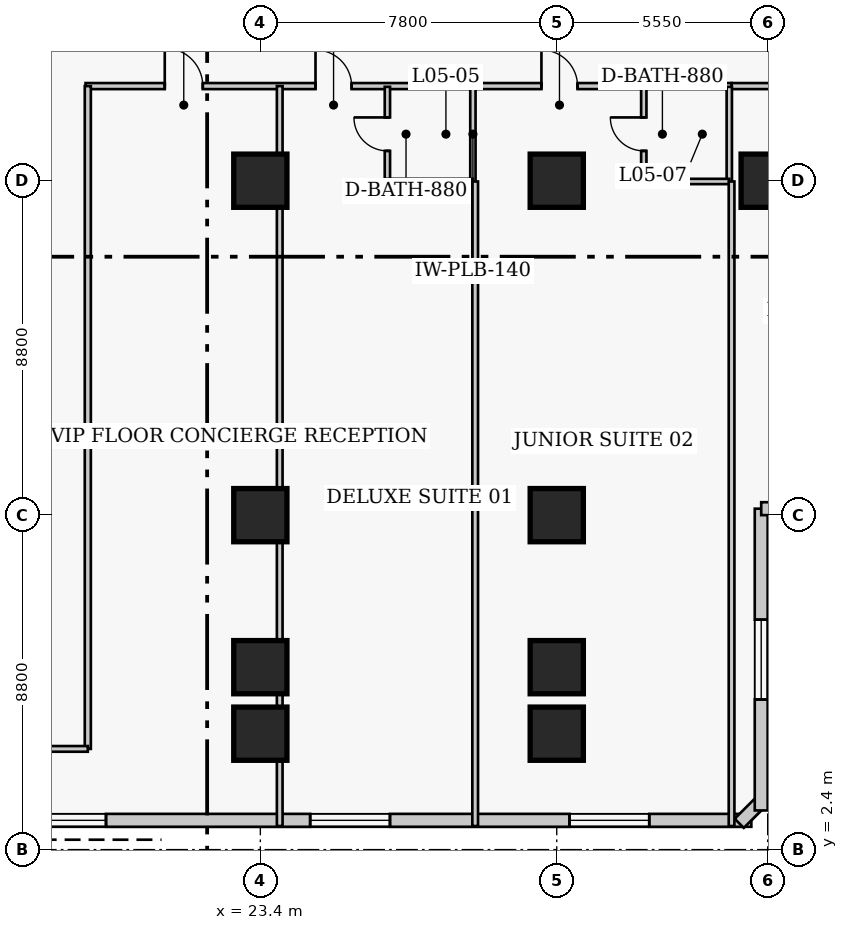
"""IFC4 building model, lengths in metres.
Left out: names, types, materials, properties, quantities, classifications, styles, units other than length and angle.
Written with IfcOpenShell. Run it as: python <this file> out.ifc"""

import sys

from ifc_helpers import new_model, si_unit, direction, frame, frame_2d, origin, origin_2d, place, context, subcontext, project, spatial, rectangle, extrude, element, fill, save


model = new_model("IFC4")
c1 = context("Model", 3, precision=1e-05, world=origin(), true_north=direction((0.0, 1.0)))
c2 = subcontext(c1, "Body", "Model", "MODEL_VIEW")
j1 = project(units=[si_unit("LENGTHUNIT", "METRE"), si_unit("PLANEANGLEUNIT", "RADIAN")], contexts=[c1])
p1 = place(None, origin())
s1 = spatial("IfcSite", under=j1, at=p1, CompositionType="ELEMENT")
p2 = place(p1, origin())
s2 = spatial("IfcBuilding", under=s1, at=p2, CompositionType="ELEMENT")
p3 = place(p2, frame((0.0, 0.0, 26.0)))
s3 = spatial("IfcBuildingStorey", under=s2, at=p3, CompositionType="ELEMENT", Elevation=26.0)
p4 = place(p3, frame((23.4, 11.2, 0.0), z_axis=(0.0, 0.0, 1.0), x_axis=(1.0, 0.0, 0.0)))
e1 = element("IfcColumn", 1, at=p4, inside=s3, PredefinedType="COLUMN", context=c2, shape_type="SweptSolid", body=[
    extrude(rectangle(XDim=1.4, YDim=1.4, at=origin_2d()), origin(), (0.0, 0.0, 1.0), 3.8),
])
p5 = place(p3, frame((23.4, 20.0, -0.26), z_axis=(0.0, 0.0, 1.0), x_axis=(1.0, 0.0, 0.0)))
e2 = element("IfcColumn", 2, at=p5, inside=s3, PredefinedType="COLUMN", context=c2, shape_type="SweptSolid", body=[
    extrude(rectangle(XDim=1.4, YDim=1.4, at=origin_2d()), origin(), (0.0, 0.0, 1.0), 4.06),
])
p6 = place(p3, frame((31.2, 11.2, 0.0), z_axis=(0.0, 0.0, 1.0), x_axis=(1.0, 0.0, 0.0)))
e3 = element("IfcColumn", 3, at=p6, inside=s3, PredefinedType="COLUMN", context=c2, shape_type="SweptSolid", body=[
    extrude(rectangle(XDim=1.4, YDim=1.4, at=origin_2d()), origin(), (0.0, 0.0, 1.0), 3.8),
])
p7 = place(p3, frame((31.2, 20.0, -0.26), z_axis=(0.0, 0.0, 1.0), x_axis=(1.0, 0.0, 0.0)))
e4 = element("IfcColumn", 4, at=p7, inside=s3, PredefinedType="COLUMN", context=c2, shape_type="SweptSolid", body=[
    extrude(rectangle(XDim=1.4, YDim=1.4, at=origin_2d()), origin(), (0.0, 0.0, 1.0), 4.06),
])
for number, where, z_axis, x_axis in (
    (5, (36.75, 20.0, 0.0), (0.0, 0.0, 1.0), (1.0, 0.0, 0.0)),
    (6, (23.4, 7.2, 0.0), (0.0, 0.0, 1.0), (1.0, 0.0, 0.0)),
    (7, (31.2, 7.2, 0.0), (0.0, 0.0, 1.0), (1.0, 0.0, 0.0)),
    (8, (23.4, 5.45, 0.0), (0.0, 0.0, 1.0), (1.0, 0.0, 0.0)),
    (9, (31.2, 5.45, 0.0), (0.0, 0.0, 1.0), (1.0, 0.0, 0.0)),
):
    element("IfcColumn", number, at=place(p3, frame(where, z_axis=z_axis, x_axis=x_axis)), inside=s3, PredefinedType="COLUMN", context=c2, shape_type="SweptSolid", body=[
        extrude(rectangle(XDim=1.4, YDim=1.4, at=origin_2d()), origin(), (0.0, 0.0, 1.0), 3.8),
    ])
p8 = place(p3, frame((6.43, 3.17, 0.0), z_axis=(0.0, 0.0, 1.0), x_axis=(1.0, 0.0, 0.0)))
e10 = element("IfcWall", 10, at=p8, inside=s3, PredefinedType="SOLIDWALL", context=c2, shape_type="SweptSolid", body=[
    extrude(rectangle(XDim=29.89, YDim=0.34, at=frame_2d((14.945, 0.0))), origin(), (0.0, 0.0, 1.0), 3.54),
])
p9 = place(p8, frame((2.686, 0.0, 0.85)))
e11 = element("IfcOpeningElement", 11, at=p9, cuts=e10, PredefinedType="OPENING", context=c2, shape_type="SweptSolid", body=[
    extrude(rectangle(XDim=2.1, YDim=1.85, at=frame_2d((1.05, 0.925))), frame((0.0, 0.18, 0.0), z_axis=(0.0, -1.0, 0.0), x_axis=(1.0, 0.0, 0.0)), (0.0, 0.0, 1.0), 0.36),
])
p10 = place(p8, frame((10.809, 0.0, 0.85)))
e12 = element("IfcOpeningElement", 12, at=p10, cuts=e10, PredefinedType="OPENING", context=c2, shape_type="SweptSolid", body=[
    extrude(rectangle(XDim=2.1, YDim=1.85, at=frame_2d((1.05, 0.925))), frame((0.0, 0.18, 0.0), z_axis=(0.0, -1.0, 0.0), x_axis=(1.0, 0.0, 0.0)), (0.0, 0.0, 1.0), 0.36),
])
p11 = place(p8, frame((18.281, 0.0, 0.85)))
e13 = element("IfcOpeningElement", 13, at=p11, cuts=e10, PredefinedType="OPENING", context=c2, shape_type="SweptSolid", body=[
    extrude(rectangle(XDim=2.1, YDim=1.85, at=frame_2d((1.05, 0.925))), frame((0.0, 0.18, 0.0), z_axis=(0.0, -1.0, 0.0), x_axis=(1.0, 0.0, 0.0)), (0.0, 0.0, 1.0), 0.36),
])
p12 = place(p8, frame((25.104, 0.0, 0.85)))
e14 = element("IfcOpeningElement", 14, at=p12, cuts=e10, PredefinedType="OPENING", context=c2, shape_type="SweptSolid", body=[
    extrude(rectangle(XDim=2.1, YDim=1.85, at=frame_2d((1.05, 0.925))), frame((0.0, 0.18, 0.0), z_axis=(0.0, -1.0, 0.0), x_axis=(1.0, 0.0, 0.0)), (0.0, 0.0, 1.0), 0.36),
])
p13 = place(p3, frame((36.001, 3.092, 0.0), z_axis=(0.0, 0.0, 1.0), x_axis=(0.707106781187, 0.707106781187, 0.0)))
e15 = element("IfcWall", 15, at=p13, inside=s3, PredefinedType="SOLIDWALL", context=c2, shape_type="SweptSolid", body=[
    extrude(rectangle(XDim=0.929, YDim=0.34, at=frame_2d((0.464, 0.0))), origin(), (0.0, 0.0, 1.0), 3.54),
])
p14 = place(p3, frame((36.58, 3.43, 0.0), z_axis=(0.0, 0.0, 1.0), x_axis=(0.0, 1.0, 0.0)))
e16 = element("IfcWall", 16, at=p14, inside=s3, PredefinedType="SOLIDWALL", context=c2, shape_type="SweptSolid", body=[
    extrude(rectangle(XDim=7.94, YDim=0.34, at=frame_2d((3.97, 0.0))), origin(), (0.0, 0.0, 1.0), 3.54),
])
p15 = place(p14, frame((2.92, 0.0, 0.85)))
e17 = element("IfcOpeningElement", 17, at=p15, cuts=e16, PredefinedType="OPENING", context=c2, shape_type="SweptSolid", body=[
    extrude(rectangle(XDim=2.1, YDim=1.85, at=frame_2d((1.05, 0.925))), frame((0.0, 0.18, 0.0), z_axis=(0.0, -1.0, 0.0), x_axis=(1.0, 0.0, 0.0)), (0.0, 0.0, 1.0), 0.36),
])
p16 = place(p3, frame((36.58, 11.37, 0.0), z_axis=(0.0, 0.0, 1.0), x_axis=(1.0, 0.0, 0.0)))
e18 = element("IfcWall", 18, at=p16, inside=s3, PredefinedType="SOLIDWALL", context=c2, shape_type="SweptSolid", body=[
    extrude(rectangle(XDim=4.84, YDim=0.34, at=frame_2d((2.42, 0.0))), origin(), (0.0, 0.0, 1.0), 3.54),
])
p17 = place(p16, frame((1.37, 0.0, 0.85)))
e19 = element("IfcOpeningElement", 19, at=p17, cuts=e18, PredefinedType="OPENING", context=c2, shape_type="SweptSolid", body=[
    extrude(rectangle(XDim=2.1, YDim=1.85, at=frame_2d((1.05, 0.925))), frame((0.0, 0.18, 0.0), z_axis=(0.0, -1.0, 0.0), x_axis=(1.0, 0.0, 0.0)), (0.0, 0.0, 1.0), 0.36),
])
p18 = place(p3, frame((18.8, 22.49, 0.0), z_axis=(0.0, 0.0, 1.0), x_axis=(1.0, 0.0, 0.0)))
e20 = element("IfcWall", 20, at=p18, inside=s3, PredefinedType="PARTITIONING", context=c2, shape_type="SweptSolid", body=[
    extrude(rectangle(XDim=17.0, YDim=0.16, at=frame_2d((8.5, 0.0))), origin(), (0.0, 0.0, 1.0), 3.54),
])
p19 = place(p18, frame((2.085, 0.0, 0.0)))
e21 = element("IfcOpeningElement", 21, at=p19, cuts=e20, PredefinedType="OPENING", context=c2, shape_type="SweptSolid", body=[
    extrude(rectangle(XDim=1.0, YDim=2.15, at=frame_2d((0.5, 1.075))), frame((0.0, 0.09, 0.0), z_axis=(0.0, -1.0, 0.0), x_axis=(1.0, 0.0, 0.0)), (0.0, 0.0, 1.0), 0.18),
])
p20 = place(p18, frame((6.052, 0.0, 0.0)))
e22 = element("IfcOpeningElement", 22, at=p20, cuts=e20, PredefinedType="OPENING", context=c2, shape_type="SweptSolid", body=[
    extrude(rectangle(XDim=0.95, YDim=2.1, at=frame_2d((0.475, 1.05))), frame((0.0, 0.09, 0.0), z_axis=(0.0, -1.0, 0.0), x_axis=(1.0, 0.0, 0.0)), (0.0, 0.0, 1.0), 0.18),
])
p21 = place(p18, frame((11.997, 0.0, 0.0)))
e23 = element("IfcOpeningElement", 23, at=p21, cuts=e20, PredefinedType="OPENING", context=c2, shape_type="SweptSolid", body=[
    extrude(rectangle(XDim=0.95, YDim=2.1, at=frame_2d((0.475, 1.05))), frame((0.0, 0.09, 0.0), z_axis=(0.0, -1.0, 0.0), x_axis=(1.0, 0.0, 0.0)), (0.0, 0.0, 1.0), 0.18),
])
p22 = place(p3, frame((35.8, 22.49, 0.0), z_axis=(0.0, 0.0, 1.0), x_axis=(1.0, 0.0, 0.0)))
e24 = element("IfcWall", 24, at=p22, inside=s3, PredefinedType="PARTITIONING", context=c2, shape_type="SweptSolid", body=[
    extrude(rectangle(XDim=22.5, YDim=0.16, at=frame_2d((11.25, 0.0))), origin(), (0.0, 0.0, 1.0), 3.54),
])
p23 = place(p22, frame((1.43, 0.0, 0.0)))
e25 = element("IfcOpeningElement", 25, at=p23, cuts=e24, PredefinedType="OPENING", context=c2, shape_type="SweptSolid", body=[
    extrude(rectangle(XDim=0.95, YDim=2.1, at=frame_2d((0.475, 1.05))), frame((0.0, 0.09, 0.0), z_axis=(0.0, -1.0, 0.0), x_axis=(1.0, 0.0, 0.0)), (0.0, 0.0, 1.0), 0.18),
])
p24 = place(p22, frame((9.015, 0.0, 0.0)))
e26 = element("IfcOpeningElement", 26, at=p24, cuts=e24, PredefinedType="OPENING", context=c2, shape_type="SweptSolid", body=[
    extrude(rectangle(XDim=1.0, YDim=2.15, at=frame_2d((0.5, 1.075))), frame((0.0, 0.09, 0.0), z_axis=(0.0, -1.0, 0.0), x_axis=(1.0, 0.0, 0.0)), (0.0, 0.0, 1.0), 0.18),
])
p25 = place(p22, frame((13.225, 0.0, 0.0)))
e27 = element("IfcOpeningElement", 27, at=p25, cuts=e24, PredefinedType="OPENING", context=c2, shape_type="SweptSolid", body=[
    extrude(rectangle(XDim=0.95, YDim=2.1, at=frame_2d((0.475, 1.05))), frame((0.0, 0.09, 0.0), z_axis=(0.0, -1.0, 0.0), x_axis=(1.0, 0.0, 0.0)), (0.0, 0.0, 1.0), 0.18),
])
p26 = place(p22, frame((18.285, 0.0, 0.0)))
e28 = element("IfcOpeningElement", 28, at=p26, cuts=e24, PredefinedType="OPENING", context=c2, shape_type="SweptSolid", body=[
    extrude(rectangle(XDim=0.95, YDim=2.1, at=frame_2d((0.475, 1.05))), frame((0.0, 0.09, 0.0), z_axis=(0.0, -1.0, 0.0), x_axis=(1.0, 0.0, 0.0)), (0.0, 0.0, 1.0), 0.18),
])
p27 = place(p3, frame((18.86, 5.05, 0.0), z_axis=(0.0, 0.0, 1.0), x_axis=(0.0, 1.0, 0.0)))
e29 = element("IfcWall", 29, at=p27, inside=s3, PredefinedType="PARTITIONING", context=c2, shape_type="SweptSolid", body=[
    extrude(rectangle(XDim=17.44, YDim=0.16, at=frame_2d((8.72, 0.0))), origin(), (0.0, 0.0, 1.0), 3.54),
])
p28 = place(p3, frame((16.64, 5.05, 0.0), z_axis=(0.0, 0.0, 1.0), x_axis=(1.0, 0.0, 0.0)))
e30 = element("IfcWall", 30, at=p28, inside=s3, PredefinedType="PARTITIONING", context=c2, shape_type="SweptSolid", body=[
    extrude(rectangle(XDim=2.22, YDim=0.15, at=frame_2d((1.11, 0.0))), origin(), (0.0, 0.0, 1.0), 3.54),
])
p29 = place(p3, frame((23.91, 3.02, 0.0), z_axis=(0.0, 0.0, 1.0), x_axis=(0.0, 1.0, 0.0)))
e31 = element("IfcWall", 31, at=p29, inside=s3, PredefinedType="PARTITIONING", context=c2, shape_type="SweptSolid", body=[
    extrude(rectangle(XDim=19.47, YDim=0.15, at=frame_2d((9.735, 0.0))), origin(), (0.0, 0.0, 1.0), 3.54),
])
p30 = place(p3, frame((26.743, 19.98, 0.0), z_axis=(0.0, 0.0, 1.0), x_axis=(0.0, 1.0, 0.0)))
e32 = element("IfcWall", 32, at=p30, inside=s3, PredefinedType="PLUMBINGWALL", context=c2, shape_type="SweptSolid", body=[
    extrude(rectangle(XDim=2.49, YDim=0.14, at=frame_2d((1.245, 0.0))), origin(), (0.0, 0.0, 1.0), 3.54),
])
p31 = place(p30, frame((0.805, 0.0, 0.0)))
e33 = element("IfcOpeningElement", 33, at=p31, cuts=e32, PredefinedType="OPENING", context=c2, shape_type="SweptSolid", body=[
    extrude(rectangle(XDim=0.88, YDim=2.05, at=frame_2d((0.44, 1.025))), frame((0.0, 0.08, 0.0), z_axis=(0.0, -1.0, 0.0), x_axis=(1.0, 0.0, 0.0)), (0.0, 0.0, 1.0), 0.16),
])
p32 = place(p3, frame((28.993, 19.98, 0.0), z_axis=(0.0, 0.0, 1.0), x_axis=(0.0, 1.0, 0.0)))
e34 = element("IfcWall", 34, at=p32, inside=s3, PredefinedType="PLUMBINGWALL", context=c2, shape_type="SweptSolid", body=[
    extrude(rectangle(XDim=2.49, YDim=0.14, at=frame_2d((1.245, 0.0))), origin(), (0.0, 0.0, 1.0), 3.54),
])
p33 = place(p3, frame((26.743, 19.98, 0.0), z_axis=(0.0, 0.0, 1.0), x_axis=(1.0, 0.0, 0.0)))
e35 = element("IfcWall", 35, at=p33, inside=s3, PredefinedType="PLUMBINGWALL", context=c2, shape_type="SweptSolid", body=[
    extrude(rectangle(XDim=2.25, YDim=0.14, at=frame_2d((1.125, 0.0))), origin(), (0.0, 0.0, 1.0), 2.593),
])
p34 = place(p3, frame((29.053, 3.02, 0.0), z_axis=(0.0, 0.0, 1.0), x_axis=(0.0, 1.0, 0.0)))
e36 = element("IfcWall", 36, at=p34, inside=s3, PredefinedType="PARTITIONING", context=c2, shape_type="SweptSolid", body=[
    extrude(rectangle(XDim=16.96, YDim=0.15, at=frame_2d((8.48, 0.0))), origin(), (0.0, 0.0, 1.0), 3.54),
])
p35 = place(p3, frame((33.49, 19.98, 0.0), z_axis=(0.0, 0.0, 1.0), x_axis=(0.0, 1.0, 0.0)))
e37 = element("IfcWall", 37, at=p35, inside=s3, PredefinedType="PLUMBINGWALL", context=c2, shape_type="SweptSolid", body=[
    extrude(rectangle(XDim=2.49, YDim=0.14, at=frame_2d((1.245, 0.0))), origin(), (0.0, 0.0, 1.0), 3.54),
])
p36 = place(p35, frame((0.805, 0.0, 0.0)))
e38 = element("IfcOpeningElement", 38, at=p36, cuts=e37, PredefinedType="OPENING", context=c2, shape_type="SweptSolid", body=[
    extrude(rectangle(XDim=0.88, YDim=2.05, at=frame_2d((0.44, 1.025))), frame((0.0, 0.08, 0.0), z_axis=(0.0, -1.0, 0.0), x_axis=(1.0, 0.0, 0.0)), (0.0, 0.0, 1.0), 0.16),
])
p37 = place(p3, frame((35.74, 19.98, 0.0), z_axis=(0.0, 0.0, 1.0), x_axis=(0.0, 1.0, 0.0)))
e39 = element("IfcWall", 39, at=p37, inside=s3, PredefinedType="PLUMBINGWALL", context=c2, shape_type="SweptSolid", body=[
    extrude(rectangle(XDim=2.49, YDim=0.14, at=frame_2d((1.245, 0.0))), origin(), (0.0, 0.0, 1.0), 3.54),
])
p38 = place(p3, frame((33.49, 19.98, 0.0), z_axis=(0.0, 0.0, 1.0), x_axis=(1.0, 0.0, 0.0)))
e40 = element("IfcWall", 40, at=p38, inside=s3, PredefinedType="PLUMBINGWALL", context=c2, shape_type="SweptSolid", body=[
    extrude(rectangle(XDim=2.25, YDim=0.14, at=frame_2d((1.125, 0.0))), origin(), (0.0, 0.0, 1.0), 2.593),
])
p39 = place(p3, frame((35.8, 3.02, 0.0), z_axis=(0.0, 0.0, 1.0), x_axis=(0.0, 1.0, 0.0)))
e41 = element("IfcWall", 41, at=p39, inside=s3, PredefinedType="PARTITIONING", context=c2, shape_type="SweptSolid", body=[
    extrude(rectangle(XDim=16.96, YDim=0.15, at=frame_2d((8.48, 0.0))), origin(), (0.0, 0.0, 1.0), 3.54),
])
p40 = place(p10, origin())
e42 = element("IfcWindow", 42, at=p40, inside=s3, PartitioningType="SINGLE_PANEL", PredefinedType="WINDOW", context=c2, shape_type="SweptSolid", body=[
    extrude(rectangle(XDim=2.1, YDim=1.85, at=frame_2d((1.05, 0.925))), frame((0.0, 0.03, 0.0), z_axis=(0.0, -1.0, 0.0), x_axis=(1.0, 0.0, 0.0)), (0.0, 0.0, 1.0), 0.06),
])
fill(e12, e42)
p41 = place(p11, origin())
e43 = element("IfcWindow", 43, at=p41, inside=s3, PartitioningType="SINGLE_PANEL", PredefinedType="WINDOW", context=c2, shape_type="SweptSolid", body=[
    extrude(rectangle(XDim=2.1, YDim=1.85, at=frame_2d((1.05, 0.925))), frame((0.0, 0.03, 0.0), z_axis=(0.0, -1.0, 0.0), x_axis=(1.0, 0.0, 0.0)), (0.0, 0.0, 1.0), 0.06),
])
fill(e13, e43)
p42 = place(p12, origin())
e44 = element("IfcWindow", 44, at=p42, inside=s3, PartitioningType="SINGLE_PANEL", PredefinedType="WINDOW", context=c2, shape_type="SweptSolid", body=[
    extrude(rectangle(XDim=2.1, YDim=1.85, at=frame_2d((1.05, 0.925))), frame((0.0, 0.03, 0.0), z_axis=(0.0, -1.0, 0.0), x_axis=(1.0, 0.0, 0.0)), (0.0, 0.0, 1.0), 0.06),
])
fill(e14, e44)
p43 = place(p15, origin())
e45 = element("IfcWindow", 45, at=p43, inside=s3, PartitioningType="SINGLE_PANEL", PredefinedType="WINDOW", context=c2, shape_type="SweptSolid", body=[
    extrude(rectangle(XDim=2.1, YDim=1.85, at=frame_2d((1.05, 0.925))), frame((0.0, 0.03, 0.0), z_axis=(0.0, -1.0, 0.0), x_axis=(1.0, 0.0, 0.0)), (0.0, 0.0, 1.0), 0.06),
])
fill(e17, e45)
p44 = place(p19, origin())
e46 = element("IfcDoor", 46, at=p44, inside=s3, OperationType="SINGLE_SWING_LEFT", PredefinedType="DOOR", context=c2, shape_type="SweptSolid", body=[
    extrude(rectangle(XDim=1.0, YDim=2.15, at=frame_2d((0.5, 1.075))), frame((0.0, 0.025, 0.0), z_axis=(0.0, -1.0, 0.0), x_axis=(1.0, 0.0, 0.0)), (0.0, 0.0, 1.0), 0.05),
])
fill(e21, e46)
p45 = place(p31, origin())
e47 = element("IfcDoor", 47, at=p45, inside=s3, OperationType="SINGLE_SWING_RIGHT", PredefinedType="DOOR", context=c2, shape_type="SweptSolid", body=[
    extrude(rectangle(XDim=0.88, YDim=2.05, at=frame_2d((0.44, 1.025))), frame((0.0, 0.025, 0.0), z_axis=(0.0, -1.0, 0.0), x_axis=(1.0, 0.0, 0.0)), (0.0, 0.0, 1.0), 0.05),
])
fill(e33, e47)
p46 = place(p20, origin())
e48 = element("IfcDoor", 48, at=p46, inside=s3, OperationType="SINGLE_SWING_LEFT", PredefinedType="DOOR", context=c2, shape_type="SweptSolid", body=[
    extrude(rectangle(XDim=0.95, YDim=2.1, at=frame_2d((0.475, 1.05))), frame((0.0, 0.025, 0.0), z_axis=(0.0, -1.0, 0.0), x_axis=(1.0, 0.0, 0.0)), (0.0, 0.0, 1.0), 0.05),
])
fill(e22, e48)
p47 = place(p36, origin())
e49 = element("IfcDoor", 49, at=p47, inside=s3, OperationType="SINGLE_SWING_RIGHT", PredefinedType="DOOR", context=c2, shape_type="SweptSolid", body=[
    extrude(rectangle(XDim=0.88, YDim=2.05, at=frame_2d((0.44, 1.025))), frame((0.0, 0.025, 0.0), z_axis=(0.0, -1.0, 0.0), x_axis=(1.0, 0.0, 0.0)), (0.0, 0.0, 1.0), 0.05),
])
fill(e38, e49)
p48 = place(p21, origin())
e50 = element("IfcDoor", 50, at=p48, inside=s3, OperationType="SINGLE_SWING_LEFT", PredefinedType="DOOR", context=c2, shape_type="SweptSolid", body=[
    extrude(rectangle(XDim=0.95, YDim=2.1, at=frame_2d((0.475, 1.05))), frame((0.0, 0.025, 0.0), z_axis=(0.0, -1.0, 0.0), x_axis=(1.0, 0.0, 0.0)), (0.0, 0.0, 1.0), 0.05),
])
fill(e23, e50)
save(model, sys.argv[1])
